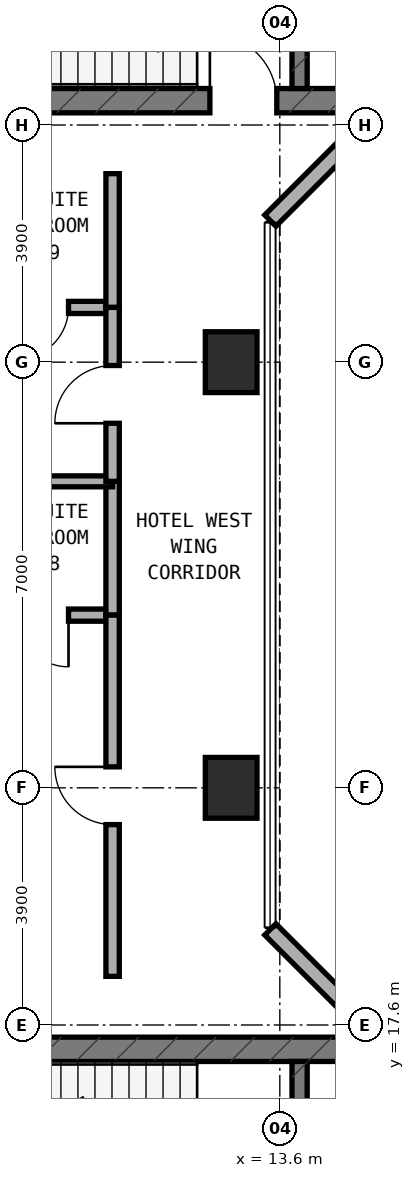
"""IFC4 building model, lengths in metres.
Left out: names, types, materials, properties, quantities, classifications, styles, units other than length and angle.
Written with IfcOpenShell. Run it as: python <this file> out.ifc"""

import sys

from ifc_helpers import new_model, si_unit, direction, frame, frame_2d, origin, origin_2d, place, context, subcontext, project, spatial, rectangle, extrude, element, fill, save


model = new_model("IFC4")
c1 = context("Model", 3, precision=1e-05, world=origin(), true_north=direction((0.0, 1.0)))
c2 = subcontext(c1, "Body", "Model", "MODEL_VIEW")
j1 = project(units=[si_unit("LENGTHUNIT", "METRE"), si_unit("PLANEANGLEUNIT", "RADIAN")], contexts=[c1])
p1 = place(None, origin())
s1 = spatial("IfcSite", under=j1, at=p1, CompositionType="ELEMENT")
p2 = place(p1, origin())
s2 = spatial("IfcBuilding", under=s1, at=p2, CompositionType="ELEMENT")
p3 = place(p2, frame((0.0, 0.0, 98.5)))
s3 = spatial("IfcBuildingStorey", under=s2, at=p3, CompositionType="ELEMENT", Elevation=98.5)
p4 = place(p3, frame((6.4, 32.8, 0.0), z_axis=(0.0, 0.0, 1.0), x_axis=(1.0, 0.0, 0.0)))
e1 = element("IfcWall", 1, at=p4, inside=s3, PredefinedType="SHEAR", context=c2, shape_type="SweptSolid", body=[
    extrude(rectangle(XDim=24.4, YDim=0.4, at=frame_2d((12.2, 0.0))), origin(), (0.0, 0.0, 1.0), 3.5),
])
p5 = place(p4, frame((6.05, 0.0, 0.0)))
e2 = element("IfcOpeningElement", 2, at=p5, cuts=e1, PredefinedType="OPENING", context=c2, shape_type="SweptSolid", body=[
    extrude(rectangle(XDim=1.1, YDim=2.15, at=frame_2d((0.55, 1.075))), frame((0.0, 0.21, 0.0), z_axis=(0.0, -1.0, 0.0), x_axis=(1.0, 0.0, 0.0)), (0.0, 0.0, 1.0), 0.42),
])
p6 = place(p3, frame((13.925, 33.0, 0.0), z_axis=(0.0, 0.0, 1.0), x_axis=(0.0, 1.0, 0.0)))
e3 = element("IfcWall", 3, at=p6, inside=s3, PredefinedType="STANDARD", context=c2, shape_type="SweptSolid", body=[
    extrude(rectangle(XDim=3.16, YDim=0.25, at=frame_2d((1.58, 0.0))), origin(), (0.0, 0.0, 1.0), 3.22),
])
p7 = place(p6, frame((0.98, 0.0, 0.0)))
e4 = element("IfcOpeningElement", 4, at=p7, cuts=e3, PredefinedType="OPENING", context=c2, shape_type="SweptSolid", body=[
    extrude(rectangle(XDim=1.1, YDim=2.15, at=frame_2d((0.55, 1.075))), frame((0.0, 0.135, 0.0), z_axis=(0.0, -1.0, 0.0), x_axis=(1.0, 0.0, 0.0)), (0.0, 0.0, 1.0), 0.27),
])
p8 = place(p3, frame((6.4, 17.2, 0.0), z_axis=(0.0, 0.0, 1.0), x_axis=(1.0, 0.0, 0.0)))
e5 = element("IfcWall", 5, at=p8, inside=s3, PredefinedType="SHEAR", context=c2, shape_type="SweptSolid", body=[
    extrude(rectangle(XDim=24.4, YDim=0.4, at=frame_2d((12.2, 0.0))), origin(), (0.0, 0.0, 1.0), 3.5),
])
p9 = place(p3, frame((13.925, 13.84, 0.0), z_axis=(0.0, 0.0, 1.0), x_axis=(0.0, 1.0, 0.0)))
e6 = element("IfcWall", 6, at=p9, inside=s3, PredefinedType="STANDARD", context=c2, shape_type="SweptSolid", body=[
    extrude(rectangle(XDim=3.16, YDim=0.25, at=frame_2d((1.58, 0.0))), origin(), (0.0, 0.0, 1.0), 3.22),
])
p10 = place(p9, frame((0.98, 0.0, 0.0)))
e7 = element("IfcOpeningElement", 7, at=p10, cuts=e6, PredefinedType="OPENING", context=c2, shape_type="SweptSolid", body=[
    extrude(rectangle(XDim=1.1, YDim=2.15, at=frame_2d((0.55, 1.075))), frame((0.0, 0.135, 0.0), z_axis=(0.0, -1.0, 0.0), x_axis=(1.0, 0.0, 0.0)), (0.0, 0.0, 1.0), 0.27),
])
for number, where, z_axis, x_axis in (
    (8, (12.8, 21.5, 0.0), (0.0, 0.0, 1.0), (1.0, 0.0, 0.0)),
    (9, (12.8, 28.5, 0.0), (0.0, 0.0, 1.0), (1.0, 0.0, 0.0)),
):
    element("IfcColumn", number, at=place(p3, frame(where, z_axis=z_axis, x_axis=x_axis)), inside=s3, PredefinedType="COLUMN", context=c2, shape_type="SweptSolid", body=[
        extrude(rectangle(XDim=0.85, YDim=1.0, at=origin_2d()), origin(), (0.0, 0.0, 1.0), 3.5),
    ])
for number, where, z_axis, x_axis in (
    (10, (15.278, 32.662, 0.0), (0.0, 0.0, 1.0), (-0.707, -0.707, 0.0)),
    (11, (13.444, 19.172, 0.0), (0.0, 0.0, 1.0), (0.707, -0.707, 0.0)),
):
    element("IfcWall", number, at=place(p3, frame(where, z_axis=z_axis, x_axis=x_axis)), inside=s3, PredefinedType="STANDARD", context=c2, shape_type="SweptSolid", body=[
        extrude(rectangle(XDim=2.594, YDim=0.26, at=frame_2d((1.297, 0.0))), origin(), (0.0, 0.0, 1.0), 3.22),
    ])
p11 = place(p3, frame((8.65, 24.34, 0.0), z_axis=(0.0, 0.0, 1.0), x_axis=(1.0, 0.0, 0.0)))
e12 = element("IfcWall", 12, at=p11, inside=s3, PredefinedType="PLUMBINGWALL", context=c2, shape_type="SweptSolid", body=[
    extrude(rectangle(XDim=2.1, YDim=0.2, at=frame_2d((1.05, 0.0))), origin(), (0.0, 0.0, 1.0), 3.22),
])
p12 = place(p11, frame((0.625, 0.0, 0.0)))
e13 = element("IfcOpeningElement", 13, at=p12, cuts=e12, PredefinedType="OPENING", context=c2, shape_type="SweptSolid", body=[
    extrude(rectangle(XDim=0.85, YDim=2.1, at=frame_2d((0.425, 1.05))), frame((0.0, 0.11, 0.0), z_axis=(0.0, -1.0, 0.0), x_axis=(1.0, 0.0, 0.0)), (0.0, 0.0, 1.0), 0.22),
])
p13 = place(p3, frame((10.85, 24.34, 0.0), z_axis=(0.0, 0.0, 1.0), x_axis=(0.0, 1.0, 0.0)))
e14 = element("IfcWall", 14, at=p13, inside=s3, PredefinedType="SOLIDWALL", context=c2, shape_type="SweptSolid", body=[
    extrude(rectangle(XDim=2.2, YDim=0.22, at=frame_2d((1.1, 0.0))), origin(), (0.0, 0.0, 1.0), 3.22),
])
p14 = place(p3, frame((10.85, 18.4, 0.0), z_axis=(0.0, 0.0, 1.0), x_axis=(0.0, 1.0, 0.0)))
e15 = element("IfcWall", 15, at=p14, inside=s3, PredefinedType="SOLIDWALL", context=c2, shape_type="SweptSolid", body=[
    extrude(rectangle(XDim=5.94, YDim=0.22, at=frame_2d((2.97, 0.0))), origin(), (0.0, 0.0, 1.0), 2.595),
])
p15 = place(p14, frame((2.495, 0.0, 0.0)))
e16 = element("IfcOpeningElement", 16, at=p15, cuts=e15, PredefinedType="OPENING", context=c2, shape_type="SweptSolid", body=[
    extrude(rectangle(XDim=0.95, YDim=2.1, at=frame_2d((0.475, 1.05))), frame((0.0, 0.12, 0.0), z_axis=(0.0, -1.0, 0.0), x_axis=(1.0, 0.0, 0.0)), (0.0, 0.0, 1.0), 0.24),
])
p16 = place(p3, frame((0.86, 26.54, 0.0), z_axis=(0.0, 0.0, 1.0), x_axis=(1.0, 0.0, 0.0)))
e17 = element("IfcWall", 17, at=p16, inside=s3, PredefinedType="SOLIDWALL", context=c2, shape_type="SweptSolid", body=[
    extrude(rectangle(XDim=9.99, YDim=0.18, at=frame_2d((4.995, 0.0))), origin(), (0.0, 0.0, 1.0), 2.835),
])
p17 = place(p3, frame((8.65, 29.4, 0.0), z_axis=(0.0, 0.0, 1.0), x_axis=(1.0, 0.0, 0.0)))
e18 = element("IfcWall", 18, at=p17, inside=s3, PredefinedType="PLUMBINGWALL", context=c2, shape_type="SweptSolid", body=[
    extrude(rectangle(XDim=2.1, YDim=0.2, at=frame_2d((1.05, 0.0))), origin(), (0.0, 0.0, 1.0), 3.22),
])
p18 = place(p17, frame((0.625, 0.0, 0.0)))
e19 = element("IfcOpeningElement", 19, at=p18, cuts=e18, PredefinedType="OPENING", context=c2, shape_type="SweptSolid", body=[
    extrude(rectangle(XDim=0.85, YDim=2.1, at=frame_2d((0.425, 1.05))), frame((0.0, 0.11, 0.0), z_axis=(0.0, -1.0, 0.0), x_axis=(1.0, 0.0, 0.0)), (0.0, 0.0, 1.0), 0.22),
])
p19 = place(p3, frame((10.85, 29.4, 0.0), z_axis=(0.0, 0.0, 1.0), x_axis=(0.0, 1.0, 0.0)))
e20 = element("IfcWall", 20, at=p19, inside=s3, PredefinedType="SOLIDWALL", context=c2, shape_type="SweptSolid", body=[
    extrude(rectangle(XDim=2.2, YDim=0.22, at=frame_2d((1.1, 0.0))), origin(), (0.0, 0.0, 1.0), 3.22),
])
p20 = place(p3, frame((10.85, 26.54, 0.0), z_axis=(0.0, 0.0, 1.0), x_axis=(0.0, 1.0, 0.0)))
e21 = element("IfcWall", 21, at=p20, inside=s3, PredefinedType="SOLIDWALL", context=c2, shape_type="SweptSolid", body=[
    extrude(rectangle(XDim=2.86, YDim=0.22, at=frame_2d((1.43, 0.0))), origin(), (0.0, 0.0, 1.0), 2.595),
])
p21 = place(p20, frame((0.955, 0.0, 0.0)))
e22 = element("IfcOpeningElement", 22, at=p21, cuts=e21, PredefinedType="OPENING", context=c2, shape_type="SweptSolid", body=[
    extrude(rectangle(XDim=0.95, YDim=2.1, at=frame_2d((0.475, 1.05))), frame((0.0, 0.12, 0.0), z_axis=(0.0, -1.0, 0.0), x_axis=(1.0, 0.0, 0.0)), (0.0, 0.0, 1.0), 0.24),
])
p22 = place(p5, origin())
e23 = element("IfcDoor", 23, at=p22, inside=s3, OperationType="SINGLE_SWING_LEFT", PredefinedType="DOOR", context=c2, shape_type="SweptSolid", body=[
    extrude(rectangle(XDim=1.1, YDim=2.15, at=frame_2d((0.55, 1.075))), frame((0.0, 0.025, 0.0), z_axis=(0.0, -1.0, 0.0), x_axis=(1.0, 0.0, 0.0)), (0.0, 0.0, 1.0), 0.05),
])
fill(e2, e23)
p23 = place(p12, frame((0.85, 0.0, 0.0), z_axis=(0.0, 0.0, 1.0), x_axis=(-1.0, 0.0, 0.0)))
e24 = element("IfcDoor", 24, at=p23, inside=s3, OperationType="SINGLE_SWING_LEFT", PredefinedType="DOOR", context=c2, shape_type="SweptSolid", body=[
    extrude(rectangle(XDim=0.85, YDim=2.1, at=frame_2d((0.425, 1.05))), frame((0.0, 0.025, 0.0), z_axis=(0.0, -1.0, 0.0), x_axis=(1.0, 0.0, 0.0)), (0.0, 0.0, 1.0), 0.05),
])
fill(e13, e24)
p24 = place(p15, origin())
e25 = element("IfcDoor", 25, at=p24, inside=s3, OperationType="SINGLE_SWING_RIGHT", PredefinedType="DOOR", context=c2, shape_type="SweptSolid", body=[
    extrude(rectangle(XDim=0.95, YDim=2.1, at=frame_2d((0.475, 1.05))), frame((0.0, 0.025, 0.0), z_axis=(0.0, -1.0, 0.0), x_axis=(1.0, 0.0, 0.0)), (0.0, 0.0, 1.0), 0.05),
])
fill(e16, e25)
p25 = place(p18, frame((0.85, 0.0, 0.0), z_axis=(0.0, 0.0, 1.0), x_axis=(-1.0, 0.0, 0.0)))
e26 = element("IfcDoor", 26, at=p25, inside=s3, OperationType="SINGLE_SWING_RIGHT", PredefinedType="DOOR", context=c2, shape_type="SweptSolid", body=[
    extrude(rectangle(XDim=0.85, YDim=2.1, at=frame_2d((0.425, 1.05))), frame((0.0, 0.025, 0.0), z_axis=(0.0, -1.0, 0.0), x_axis=(1.0, 0.0, 0.0)), (0.0, 0.0, 1.0), 0.05),
])
fill(e19, e26)
p26 = place(p21, origin())
e27 = element("IfcDoor", 27, at=p26, inside=s3, OperationType="SINGLE_SWING_LEFT", PredefinedType="DOOR", context=c2, shape_type="SweptSolid", body=[
    extrude(rectangle(XDim=0.95, YDim=2.1, at=frame_2d((0.475, 1.05))), frame((0.0, 0.025, 0.0), z_axis=(0.0, -1.0, 0.0), x_axis=(1.0, 0.0, 0.0)), (0.0, 0.0, 1.0), 0.05),
])
fill(e22, e27)
save(model, sys.argv[1])
